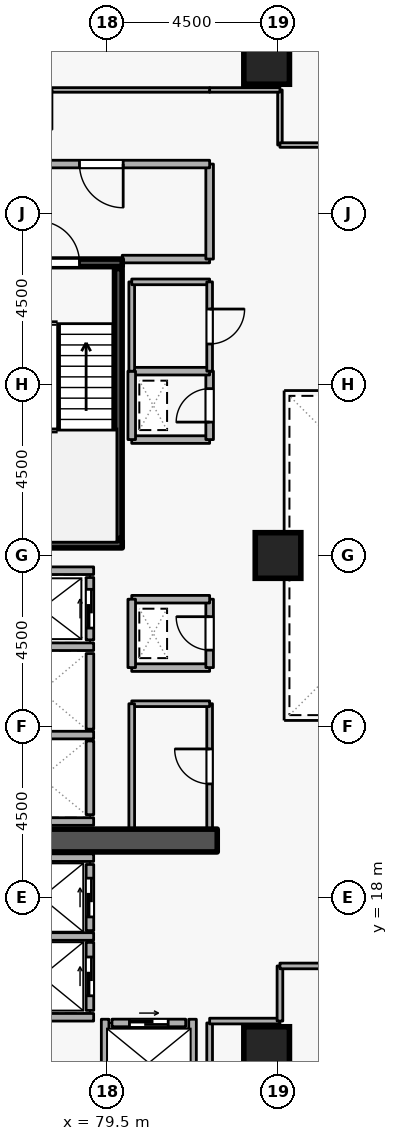
"""IFC4 building model, lengths in metres.
Left out: names, types, materials, properties, quantities, classifications, styles, units other than length and angle.
Written with IfcOpenShell. Run it as: python <this file> out.ifc"""

import sys

from ifc_helpers import new_model, si_unit, direction, frame, frame_2d, origin, origin_2d, place, context, subcontext, project, spatial, rectangle, extrude, element, fill, save


model = new_model("IFC4")
c1 = context("Model", 3, precision=1e-05, world=origin(), true_north=direction((0.0, 1.0)))
c2 = subcontext(c1, "Body", "Model", "MODEL_VIEW")
j1 = project(units=[si_unit("LENGTHUNIT", "METRE"), si_unit("PLANEANGLEUNIT", "RADIAN")], contexts=[c1])
p1 = place(None, origin())
s1 = spatial("IfcSite", under=j1, at=p1, CompositionType="ELEMENT")
p2 = place(p1, origin())
s2 = spatial("IfcBuilding", under=s1, at=p2, CompositionType="ELEMENT")
p3 = place(p2, frame((0.0, 0.0, 101.7)))
s3 = spatial("IfcBuildingStorey", under=s2, at=p3, CompositionType="ELEMENT", Elevation=101.7)
p4 = place(p3, frame((76.7, 19.5, 0.0), z_axis=(0.0, 0.0, 1.0), x_axis=(1.0, 0.0, 0.0)))
e1 = element("IfcWall", 1, at=p4, inside=s3, PredefinedType="SHEAR", context=c2, shape_type="SweptSolid", body=[
    extrude(rectangle(XDim=5.7, YDim=0.6, at=frame_2d((2.85, 0.0))), origin(), (0.0, 0.0, 1.0), 3.6),
])
for number, where, z_axis, x_axis in (
    (2, (83.7, 14.0, 0.0), (0.0, 0.0, 1.0), (1.0, 0.0, 0.0)),
    (3, (83.7, 40.0, 0.0), (0.0, 0.0, 1.0), (1.0, 0.0, 0.0)),
    (4, (84.0, 27.0, 0.0), (0.0, 0.0, 1.0), (1.0, 0.0, 0.0)),
):
    element("IfcColumn", number, at=place(p3, frame(where, z_axis=z_axis, x_axis=x_axis)), inside=s3, PredefinedType="COLUMN", context=c2, shape_type="SweptSolid", body=[
        extrude(rectangle(XDim=1.2, YDim=1.2, at=origin_2d()), origin(), (0.0, 0.0, 1.0), 3.6),
    ])
p5 = place(p3, frame((79.05, 24.78, 0.0), z_axis=(0.0, 0.0, 1.0), x_axis=(0.0, 1.0, 0.0)))
e5 = element("IfcWall", 5, at=p5, inside=s3, PredefinedType="STANDARD", context=c2, shape_type="SweptSolid", body=[
    extrude(rectangle(XDim=1.64, YDim=0.2, at=frame_2d((0.82, 0.0))), origin(), (0.0, 0.0, 1.0), 3.34),
])
p6 = place(p5, frame((0.31, 0.0, 0.0)))
e6 = element("IfcOpeningElement", 6, at=p6, cuts=e5, PredefinedType="OPENING", context=c2, shape_type="SweptSolid", body=[
    extrude(rectangle(XDim=1.02, YDim=2.06, at=frame_2d((0.51, 1.03))), frame((0.0, 0.11, 0.0), z_axis=(0.0, -1.0, 0.0), x_axis=(1.0, 0.0, 0.0)), (0.0, 0.0, 1.0), 0.22),
])
p7 = place(p3, frame((79.05, 22.43, 0.0), z_axis=(0.0, 0.0, 1.0), x_axis=(0.0, 1.0, 0.0)))
e7 = element("IfcWall", 7, at=p7, inside=s3, PredefinedType="STANDARD", context=c2, shape_type="SweptSolid", body=[
    extrude(rectangle(XDim=1.99, YDim=0.2, at=frame_2d((0.995, 0.0))), origin(), (0.0, 0.0, 1.0), 3.34),
])
p8 = place(p3, frame((79.05, 20.18, 0.0), z_axis=(0.0, 0.0, 1.0), x_axis=(0.0, 1.0, 0.0)))
e8 = element("IfcWall", 8, at=p8, inside=s3, PredefinedType="STANDARD", context=c2, shape_type="SweptSolid", body=[
    extrude(rectangle(XDim=1.94, YDim=0.2, at=frame_2d((0.97, 0.0))), origin(), (0.0, 0.0, 1.0), 3.34),
])
p9 = place(p3, frame((79.05, 17.13, 0.0), z_axis=(0.0, 0.0, 1.0), x_axis=(0.0, 1.0, 0.0)))
e9 = element("IfcWall", 9, at=p9, inside=s3, PredefinedType="STANDARD", context=c2, shape_type="SweptSolid", body=[
    extrude(rectangle(XDim=1.74, YDim=0.2, at=frame_2d((0.87, 0.0))), origin(), (0.0, 0.0, 1.0), 3.34),
])
p10 = place(p9, frame((0.36, 0.0, 0.0)))
e10 = element("IfcOpeningElement", 10, at=p10, cuts=e9, PredefinedType="OPENING", context=c2, shape_type="SweptSolid", body=[
    extrude(rectangle(XDim=1.02, YDim=2.06, at=frame_2d((0.51, 1.03))), frame((0.0, 0.11, 0.0), z_axis=(0.0, -1.0, 0.0), x_axis=(1.0, 0.0, 0.0)), (0.0, 0.0, 1.0), 0.22),
])
p11 = place(p3, frame((79.05, 15.03, 0.0), z_axis=(0.0, 0.0, 1.0), x_axis=(0.0, 1.0, 0.0)))
e11 = element("IfcWall", 11, at=p11, inside=s3, PredefinedType="STANDARD", context=c2, shape_type="SweptSolid", body=[
    extrude(rectangle(XDim=1.79, YDim=0.2, at=frame_2d((0.895, 0.0))), origin(), (0.0, 0.0, 1.0), 3.34),
])
p12 = place(p11, frame((0.385, 0.0, 0.0)))
e12 = element("IfcOpeningElement", 12, at=p12, cuts=e11, PredefinedType="OPENING", context=c2, shape_type="SweptSolid", body=[
    extrude(rectangle(XDim=1.02, YDim=2.06, at=frame_2d((0.51, 1.03))), frame((0.0, 0.11, 0.0), z_axis=(0.0, -1.0, 0.0), x_axis=(1.0, 0.0, 0.0)), (0.0, 0.0, 1.0), 0.22),
])
p13 = place(p3, frame((79.63, 14.7, 0.0), z_axis=(0.0, 0.0, 1.0), x_axis=(1.0, 0.0, 0.0)))
e13 = element("IfcWall", 13, at=p13, inside=s3, PredefinedType="STANDARD", context=c2, shape_type="SweptSolid", body=[
    extrude(rectangle(XDim=1.94, YDim=0.2, at=frame_2d((0.97, 0.0))), origin(), (0.0, 0.0, 1.0), 3.34),
])
p14 = place(p13, frame((0.46, 0.0, 0.0)))
e14 = element("IfcOpeningElement", 14, at=p14, cuts=e13, PredefinedType="OPENING", context=c2, shape_type="SweptSolid", body=[
    extrude(rectangle(XDim=1.02, YDim=2.06, at=frame_2d((0.51, 1.03))), frame((0.0, 0.11, 0.0), z_axis=(0.0, -1.0, 0.0), x_axis=(1.0, 0.0, 0.0)), (0.0, 0.0, 1.0), 0.22),
])
for number, where, z_axis, x_axis in (
    (15, (76.712, 26.6, 0.0), (0.0, 0.0, 1.0), (1.0, 0.0, 0.0)),
    (16, (76.712, 24.6, 0.0), (0.0, 0.0, 1.0), (1.0, 0.0, 0.0)),
    (17, (76.712, 22.275, 0.0), (0.0, 0.0, 1.0), (1.0, 0.0, 0.0)),
    (18, (76.712, 20.0, 0.0), (0.0, 0.0, 1.0), (1.0, 0.0, 0.0)),
):
    element("IfcWall", number, at=place(p3, frame(where, z_axis=z_axis, x_axis=x_axis)), inside=s3, PredefinedType="STANDARD", context=c2, shape_type="SweptSolid", body=[
        extrude(rectangle(XDim=2.436, YDim=0.2, at=frame_2d((1.218, 0.0))), origin(), (0.0, 0.0, 1.0), 3.34),
    ])
p15 = place(p3, frame((76.402, 19.05, 0.0), z_axis=(0.0, 0.0, 1.0), x_axis=(1.0, 0.0, 0.0)))
e19 = element("IfcWall", 19, at=p15, inside=s3, PredefinedType="STANDARD", context=c2, shape_type="SweptSolid", body=[
    extrude(rectangle(XDim=2.746, YDim=0.2, at=frame_2d((1.373, 0.0))), origin(), (0.0, 0.0, 1.0), 2.545),
])
p16 = place(p3, frame((76.402, 16.975, 0.0), z_axis=(0.0, 0.0, 1.0), x_axis=(1.0, 0.0, 0.0)))
e20 = element("IfcWall", 20, at=p16, inside=s3, PredefinedType="STANDARD", context=c2, shape_type="SweptSolid", body=[
    extrude(rectangle(XDim=2.746, YDim=0.2, at=frame_2d((1.373, 0.0))), origin(), (0.0, 0.0, 1.0), 3.34),
])
p17 = place(p3, frame((76.512, 14.85, 0.0), z_axis=(0.0, 0.0, 1.0), x_axis=(1.0, 0.0, 0.0)))
e21 = element("IfcWall", 21, at=p17, inside=s3, PredefinedType="STANDARD", context=c2, shape_type="SweptSolid", body=[
    extrude(rectangle(XDim=2.636, YDim=0.2, at=frame_2d((1.318, 0.0))), origin(), (0.0, 0.0, 1.0), 3.34),
])
for number, where, z_axis, x_axis in (
    (22, (81.75, 12.612, 0.0), (0.0, 0.0, 1.0), (0.0, 1.0, 0.0)),
    (23, (79.45, 12.612, 0.0), (0.0, 0.0, 1.0), (0.0, 1.0, 0.0)),
):
    element("IfcWall", number, at=place(p3, frame(where, z_axis=z_axis, x_axis=x_axis)), inside=s3, PredefinedType="STANDARD", context=c2, shape_type="SweptSolid", body=[
        extrude(rectangle(XDim=2.186, YDim=0.2, at=frame_2d((1.093, 0.0))), origin(), (0.0, 0.0, 1.0), 3.34),
    ])
p18 = place(p3, frame((76.55, 34.7, 0.0), z_axis=(0.0, 0.0, 1.0), x_axis=(1.0, 0.0, 0.0)))
e24 = element("IfcWall", 24, at=p18, inside=s3, PredefinedType="SHEAR", context=c2, shape_type="SweptSolid", body=[
    extrude(rectangle(XDim=3.35, YDim=0.2, at=frame_2d((1.675, 0.0))), origin(), (0.0, 0.0, 1.0), 3.6),
])
p19 = place(p18, frame((1.125, 0.0, 0.0)))
e25 = element("IfcOpeningElement", 25, at=p19, cuts=e24, PredefinedType="OPENING", context=c2, shape_type="SweptSolid", body=[
    extrude(rectangle(XDim=1.1, YDim=2.1, at=frame_2d((0.55, 1.05))), frame((0.0, 0.11, 0.0), z_axis=(0.0, -1.0, 0.0), x_axis=(1.0, 0.0, 0.0)), (0.0, 0.0, 1.0), 0.22),
])
p20 = place(p3, frame((79.9, 27.3, 0.0), z_axis=(0.0, 0.0, 1.0), x_axis=(-1.0, 0.0, 0.0)))
e26 = element("IfcWall", 26, at=p20, inside=s3, PredefinedType="SHEAR", context=c2, shape_type="SweptSolid", body=[
    extrude(rectangle(XDim=3.35, YDim=0.2, at=frame_2d((1.675, 0.0))), origin(), (0.0, 0.0, 1.0), 3.6),
])
p21 = place(p3, frame((79.797, 27.45, 0.0), z_axis=(0.0, 0.0, 1.0), x_axis=(0.0, 1.0, 0.0)))
e27 = element("IfcWall", 27, at=p21, inside=s3, PredefinedType="SHEAR", context=c2, shape_type="SweptSolid", body=[
    extrude(rectangle(XDim=7.1, YDim=0.2, at=frame_2d((3.55, 0.0))), origin(), (0.0, 0.0, 1.0), 3.6),
])
p22 = place(p3, frame((79.9, 34.8, 0.0), z_axis=(0.0, 0.0, 1.0), x_axis=(1.0, 0.0, 0.0)))
e28 = element("IfcWall", 28, at=p22, inside=s3, PredefinedType="STANDARD", context=c2, shape_type="SweptSolid", body=[
    extrude(rectangle(XDim=2.3, YDim=0.2, at=frame_2d((1.15, 0.0))), origin(), (0.0, 0.0, 1.0), 2.545),
])
p23 = place(p3, frame((82.2, 34.8, 0.0), z_axis=(0.0, 0.0, 1.0), x_axis=(0.0, 1.0, 0.0)))
e29 = element("IfcWall", 29, at=p23, inside=s3, PredefinedType="STANDARD", context=c2, shape_type="SweptSolid", body=[
    extrude(rectangle(XDim=2.5, YDim=0.2, at=frame_2d((1.25, 0.0))), origin(), (0.0, 0.0, 1.0), 3.34),
])
p24 = place(p3, frame((82.2, 37.3, 0.0), z_axis=(0.0, 0.0, 1.0), x_axis=(-1.0, 0.0, 0.0)))
e30 = element("IfcWall", 30, at=p24, inside=s3, PredefinedType="STANDARD", context=c2, shape_type="SweptSolid", body=[
    extrude(rectangle(XDim=5.7, YDim=0.2, at=frame_2d((2.85, 0.0))), origin(), (0.0, 0.0, 1.0), 3.34),
])
p25 = place(p24, frame((2.275, 0.0, 0.0)))
e31 = element("IfcOpeningElement", 31, at=p25, cuts=e30, PredefinedType="OPENING", context=c2, shape_type="SweptSolid", body=[
    extrude(rectangle(XDim=1.15, YDim=2.1, at=frame_2d((0.575, 1.05))), frame((0.0, 0.11, 0.0), z_axis=(0.0, -1.0, 0.0), x_axis=(1.0, 0.0, 0.0)), (0.0, 0.0, 1.0), 0.22),
])
p26 = place(p3, frame((80.15, 24.05, 0.0), z_axis=(0.0, 0.0, 1.0), x_axis=(1.0, 0.0, 0.0)))
e32 = element("IfcWall", 32, at=p26, inside=s3, PredefinedType="STANDARD", context=c2, shape_type="SweptSolid", body=[
    extrude(rectangle(XDim=2.05, YDim=0.2, at=frame_2d((1.025, 0.0))), origin(), (0.0, 0.0, 1.0), 3.34),
])
p27 = place(p3, frame((82.2, 24.05, 0.0), z_axis=(0.0, 0.0, 1.0), x_axis=(0.0, 1.0, 0.0)))
e33 = element("IfcWall", 33, at=p27, inside=s3, PredefinedType="STANDARD", context=c2, shape_type="SweptSolid", body=[
    extrude(rectangle(XDim=1.8, YDim=0.2, at=frame_2d((0.9, 0.0))), origin(), (0.0, 0.0, 1.0), 3.34),
])
p28 = place(p27, frame((0.46, 0.0, 0.0)))
e34 = element("IfcOpeningElement", 34, at=p28, cuts=e33, PredefinedType="OPENING", context=c2, shape_type="SweptSolid", body=[
    extrude(rectangle(XDim=0.88, YDim=2.04, at=frame_2d((0.44, 1.02))), frame((0.0, 0.11, 0.0), z_axis=(0.0, -1.0, 0.0), x_axis=(1.0, 0.0, 0.0)), (0.0, 0.0, 1.0), 0.22),
])
p29 = place(p3, frame((82.2, 25.85, 0.0), z_axis=(0.0, 0.0, 1.0), x_axis=(-1.0, 0.0, 0.0)))
e35 = element("IfcWall", 35, at=p29, inside=s3, PredefinedType="STANDARD", context=c2, shape_type="SweptSolid", body=[
    extrude(rectangle(XDim=2.05, YDim=0.2, at=frame_2d((1.025, 0.0))), origin(), (0.0, 0.0, 1.0), 3.34),
])
p30 = place(p3, frame((80.15, 25.85, 0.0), z_axis=(0.0, 0.0, 1.0), x_axis=(0.0, -1.0, 0.0)))
e36 = element("IfcWall", 36, at=p30, inside=s3, PredefinedType="STANDARD", context=c2, shape_type="SweptSolid", body=[
    extrude(rectangle(XDim=1.8, YDim=0.2, at=frame_2d((0.9, 0.0))), origin(), (0.0, 0.0, 1.0), 3.34),
])
p31 = place(p3, frame((80.15, 30.05, 0.0), z_axis=(0.0, 0.0, 1.0), x_axis=(1.0, 0.0, 0.0)))
e37 = element("IfcWall", 37, at=p31, inside=s3, PredefinedType="STANDARD", context=c2, shape_type="SweptSolid", body=[
    extrude(rectangle(XDim=2.05, YDim=0.2, at=frame_2d((1.025, 0.0))), origin(), (0.0, 0.0, 1.0), 3.34),
])
p32 = place(p3, frame((82.2, 30.05, 0.0), z_axis=(0.0, 0.0, 1.0), x_axis=(0.0, 1.0, 0.0)))
e38 = element("IfcWall", 38, at=p32, inside=s3, PredefinedType="STANDARD", context=c2, shape_type="SweptSolid", body=[
    extrude(rectangle(XDim=1.8, YDim=0.2, at=frame_2d((0.9, 0.0))), origin(), (0.0, 0.0, 1.0), 3.34),
])
p33 = place(p32, frame((0.46, 0.0, 0.0)))
e39 = element("IfcOpeningElement", 39, at=p33, cuts=e38, PredefinedType="OPENING", context=c2, shape_type="SweptSolid", body=[
    extrude(rectangle(XDim=0.88, YDim=2.04, at=frame_2d((0.44, 1.02))), frame((0.0, 0.11, 0.0), z_axis=(0.0, -1.0, 0.0), x_axis=(1.0, 0.0, 0.0)), (0.0, 0.0, 1.0), 0.22),
])
p34 = place(p3, frame((82.2, 31.85, 0.0), z_axis=(0.0, 0.0, 1.0), x_axis=(-1.0, 0.0, 0.0)))
e40 = element("IfcWall", 40, at=p34, inside=s3, PredefinedType="STANDARD", context=c2, shape_type="SweptSolid", body=[
    extrude(rectangle(XDim=2.05, YDim=0.2, at=frame_2d((1.025, 0.0))), origin(), (0.0, 0.0, 1.0), 3.34),
])
p35 = place(p3, frame((80.15, 31.85, 0.0), z_axis=(0.0, 0.0, 1.0), x_axis=(0.0, -1.0, 0.0)))
e41 = element("IfcWall", 41, at=p35, inside=s3, PredefinedType="STANDARD", context=c2, shape_type="SweptSolid", body=[
    extrude(rectangle(XDim=1.8, YDim=0.2, at=frame_2d((0.9, 0.0))), origin(), (0.0, 0.0, 1.0), 3.34),
])
p36 = place(p3, frame((82.2, 19.8, 0.0), z_axis=(0.0, 0.0, 1.0), x_axis=(0.0, 1.0, 0.0)))
e42 = element("IfcWall", 42, at=p36, inside=s3, PredefinedType="PARTITIONING", context=c2, shape_type="SweptSolid", body=[
    extrude(rectangle(XDim=3.3, YDim=0.15, at=frame_2d((1.65, 0.0))), origin(), (0.0, 0.0, 1.0), 3.34),
])
p37 = place(p36, frame((1.19, 0.0, 0.0)))
e43 = element("IfcOpeningElement", 43, at=p37, cuts=e42, PredefinedType="OPENING", context=c2, shape_type="SweptSolid", body=[
    extrude(rectangle(XDim=0.92, YDim=2.08, at=frame_2d((0.46, 1.04))), frame((0.0, 0.085, 0.0), z_axis=(0.0, -1.0, 0.0), x_axis=(1.0, 0.0, 0.0)), (0.0, 0.0, 1.0), 0.17),
])
p38 = place(p3, frame((82.2, 23.1, 0.0), z_axis=(0.0, 0.0, 1.0), x_axis=(-1.0, 0.0, 0.0)))
e44 = element("IfcWall", 44, at=p38, inside=s3, PredefinedType="PARTITIONING", context=c2, shape_type="SweptSolid", body=[
    extrude(rectangle(XDim=2.05, YDim=0.15, at=frame_2d((1.025, 0.0))), origin(), (0.0, 0.0, 1.0), 3.34),
])
p39 = place(p3, frame((80.15, 23.1, 0.0), z_axis=(0.0, 0.0, 1.0), x_axis=(0.0, -1.0, 0.0)))
e45 = element("IfcWall", 45, at=p39, inside=s3, PredefinedType="PARTITIONING", context=c2, shape_type="SweptSolid", body=[
    extrude(rectangle(XDim=3.3, YDim=0.15, at=frame_2d((1.65, 0.0))), origin(), (0.0, 0.0, 1.0), 3.34),
])
p40 = place(p3, frame((80.15, 31.85, 0.0), z_axis=(0.0, 0.0, 1.0), x_axis=(0.0, 1.0, 0.0)))
e46 = element("IfcWall", 46, at=p40, inside=s3, PredefinedType="PARTITIONING", context=c2, shape_type="SweptSolid", body=[
    extrude(rectangle(XDim=2.35, YDim=0.15, at=frame_2d((1.175, 0.0))), origin(), (0.0, 0.0, 1.0), 3.34),
])
p41 = place(p3, frame((80.15, 34.2, 0.0), z_axis=(0.0, 0.0, 1.0), x_axis=(1.0, 0.0, 0.0)))
e47 = element("IfcWall", 47, at=p41, inside=s3, PredefinedType="PARTITIONING", context=c2, shape_type="SweptSolid", body=[
    extrude(rectangle(XDim=2.05, YDim=0.15, at=frame_2d((1.025, 0.0))), origin(), (0.0, 0.0, 1.0), 2.545),
])
p42 = place(p3, frame((82.2, 34.2, 0.0), z_axis=(0.0, 0.0, 1.0), x_axis=(0.0, -1.0, 0.0)))
e48 = element("IfcWall", 48, at=p42, inside=s3, PredefinedType="PARTITIONING", context=c2, shape_type="SweptSolid", body=[
    extrude(rectangle(XDim=2.35, YDim=0.15, at=frame_2d((1.175, 0.0))), origin(), (0.0, 0.0, 1.0), 3.34),
])
p43 = place(p42, frame((0.715, 0.0, 0.0)))
e49 = element("IfcOpeningElement", 49, at=p43, cuts=e48, PredefinedType="OPENING", context=c2, shape_type="SweptSolid", body=[
    extrude(rectangle(XDim=0.92, YDim=2.08, at=frame_2d((0.46, 1.04))), frame((0.0, 0.085, 0.0), z_axis=(0.0, -1.0, 0.0), x_axis=(1.0, 0.0, 0.0)), (0.0, 0.0, 1.0), 0.17),
])
p44 = place(p3, frame((82.2, 12.4, 0.0), z_axis=(0.0, 0.0, 1.0), x_axis=(0.0, 1.0, 0.0)))
e50 = element("IfcWall", 50, at=p44, inside=s3, PredefinedType="PARTITIONING", context=c2, shape_type="SweptSolid", body=[
    extrude(rectangle(XDim=2.3, YDim=0.15, at=frame_2d((1.15, 0.0))), origin(), (0.0, 0.0, 1.0), 3.34),
])
p45 = place(p3, frame((82.2, 14.75, 0.0), z_axis=(0.0, 0.0, 1.0), x_axis=(1.0, 0.0, 0.0)))
e51 = element("IfcWall", 51, at=p45, inside=s3, PredefinedType="PARTITIONING", context=c2, shape_type="SweptSolid", body=[
    extrude(rectangle(XDim=1.85, YDim=0.15, at=frame_2d((0.925, 0.0))), origin(), (0.0, 0.0, 1.0), 3.34),
])
p46 = place(p3, frame((84.05, 14.75, 0.0), z_axis=(0.0, 0.0, 1.0), x_axis=(0.0, 1.0, 0.0)))
e52 = element("IfcWall", 52, at=p46, inside=s3, PredefinedType="PARTITIONING", context=c2, shape_type="SweptSolid", body=[
    extrude(rectangle(XDim=1.45, YDim=0.15, at=frame_2d((0.725, 0.0))), origin(), (0.0, 0.0, 1.0), 3.34),
])
p47 = place(p3, frame((84.05, 16.2, 0.0), z_axis=(0.0, 0.0, 1.0), x_axis=(1.0, 0.0, 0.0)))
e53 = element("IfcWall", 53, at=p47, inside=s3, PredefinedType="PARTITIONING", context=c2, shape_type="SweptSolid", body=[
    extrude(rectangle(XDim=4.45, YDim=0.15, at=frame_2d((2.225, 0.0))), origin(), (0.0, 0.0, 1.0), 3.34),
])
p48 = place(p47, frame((1.575, 0.0, 0.0)))
e54 = element("IfcOpeningElement", 54, at=p48, cuts=e53, PredefinedType="OPENING", context=c2, shape_type="SweptSolid", body=[
    extrude(rectangle(XDim=1.3, YDim=2.12, at=frame_2d((0.65, 1.06))), frame((0.0, 0.085, 0.0), z_axis=(0.0, -1.0, 0.0), x_axis=(1.0, 0.0, 0.0)), (0.0, 0.0, 1.0), 0.17),
])
p49 = place(p3, frame((84.05, 37.8, 0.0), z_axis=(0.0, 0.0, 1.0), x_axis=(0.0, 1.0, 0.0)))
e55 = element("IfcWall", 55, at=p49, inside=s3, PredefinedType="PARTITIONING", context=c2, shape_type="SweptSolid", body=[
    extrude(rectangle(XDim=1.45, YDim=0.12, at=frame_2d((0.725, 0.0))), origin(), (0.0, 0.0, 1.0), 3.34),
])
p50 = place(p3, frame((84.05, 39.25, 0.0), z_axis=(0.0, 0.0, 1.0), x_axis=(-1.0, 0.0, 0.0)))
e56 = element("IfcWall", 56, at=p50, inside=s3, PredefinedType="PARTITIONING", context=c2, shape_type="SweptSolid", body=[
    extrude(rectangle(XDim=1.85, YDim=0.12, at=frame_2d((0.925, 0.0))), origin(), (0.0, 0.0, 1.0), 3.34),
])
p51 = place(p3, frame((82.2, 39.25, 0.0), z_axis=(0.0, 0.0, 1.0), x_axis=(-1.0, 0.0, 0.0)))
e57 = element("IfcWall", 57, at=p51, inside=s3, PredefinedType="PARTITIONING", context=c2, shape_type="SweptSolid", body=[
    extrude(rectangle(XDim=9.35, YDim=0.12, at=frame_2d((4.675, 0.0))), origin(), (0.0, 0.0, 1.0), 3.34),
])
p52 = place(p51, frame((4.15, 0.0, 0.0)))
e58 = element("IfcOpeningElement", 58, at=p52, cuts=e57, PredefinedType="OPENING", context=c2, shape_type="SweptSolid", body=[
    extrude(rectangle(XDim=1.05, YDim=2.1, at=frame_2d((0.525, 1.05))), frame((0.0, 0.07, 0.0), z_axis=(0.0, -1.0, 0.0), x_axis=(1.0, 0.0, 0.0)), (0.0, 0.0, 1.0), 0.14),
])
p53 = place(p3, frame((88.5, 37.8, 0.0), z_axis=(0.0, 0.0, 1.0), x_axis=(-1.0, 0.0, 0.0)))
e59 = element("IfcWall", 59, at=p53, inside=s3, PredefinedType="PARTITIONING", context=c2, shape_type="SweptSolid", body=[
    extrude(rectangle(XDim=4.45, YDim=0.12, at=frame_2d((2.225, 0.0))), origin(), (0.0, 0.0, 1.0), 3.34),
])
p54 = place(p6, origin())
e60 = element("IfcDoor", 60, at=p54, inside=s3, OperationType="SLIDING_TO_LEFT", PredefinedType="DOOR", context=c2, shape_type="SweptSolid", body=[
    extrude(rectangle(XDim=1.02, YDim=2.06, at=frame_2d((0.51, 1.03))), frame((0.0, 0.025, 0.0), z_axis=(0.0, -1.0, 0.0), x_axis=(1.0, 0.0, 0.0)), (0.0, 0.0, 1.0), 0.05),
])
fill(e6, e60)
p55 = place(p10, origin())
e61 = element("IfcDoor", 61, at=p55, inside=s3, OperationType="SLIDING_TO_LEFT", PredefinedType="DOOR", context=c2, shape_type="SweptSolid", body=[
    extrude(rectangle(XDim=1.02, YDim=2.06, at=frame_2d((0.51, 1.03))), frame((0.0, 0.025, 0.0), z_axis=(0.0, -1.0, 0.0), x_axis=(1.0, 0.0, 0.0)), (0.0, 0.0, 1.0), 0.05),
])
fill(e10, e61)
p56 = place(p12, origin())
e62 = element("IfcDoor", 62, at=p56, inside=s3, OperationType="SLIDING_TO_LEFT", PredefinedType="DOOR", context=c2, shape_type="SweptSolid", body=[
    extrude(rectangle(XDim=1.02, YDim=2.06, at=frame_2d((0.51, 1.03))), frame((0.0, 0.025, 0.0), z_axis=(0.0, -1.0, 0.0), x_axis=(1.0, 0.0, 0.0)), (0.0, 0.0, 1.0), 0.05),
])
fill(e12, e62)
p57 = place(p14, origin())
e63 = element("IfcDoor", 63, at=p57, inside=s3, OperationType="SLIDING_TO_LEFT", PredefinedType="DOOR", context=c2, shape_type="SweptSolid", body=[
    extrude(rectangle(XDim=1.02, YDim=2.06, at=frame_2d((0.51, 1.03))), frame((0.0, 0.025, 0.0), z_axis=(0.0, -1.0, 0.0), x_axis=(1.0, 0.0, 0.0)), (0.0, 0.0, 1.0), 0.05),
])
fill(e14, e63)
p58 = place(p19, origin())
e64 = element("IfcDoor", 64, at=p58, inside=s3, OperationType="SINGLE_SWING_LEFT", PredefinedType="DOOR", context=c2, shape_type="SweptSolid", body=[
    extrude(rectangle(XDim=1.1, YDim=2.1, at=frame_2d((0.55, 1.05))), frame((0.0, 0.025, 0.0), z_axis=(0.0, -1.0, 0.0), x_axis=(1.0, 0.0, 0.0)), (0.0, 0.0, 1.0), 0.05),
])
fill(e25, e64)
p59 = place(p25, origin())
e65 = element("IfcDoor", 65, at=p59, inside=s3, OperationType="SINGLE_SWING_LEFT", PredefinedType="DOOR", context=c2, shape_type="SweptSolid", body=[
    extrude(rectangle(XDim=1.15, YDim=2.1, at=frame_2d((0.575, 1.05))), frame((0.0, 0.025, 0.0), z_axis=(0.0, -1.0, 0.0), x_axis=(1.0, 0.0, 0.0)), (0.0, 0.0, 1.0), 0.05),
])
fill(e31, e65)
p60 = place(p28, origin())
e66 = element("IfcDoor", 66, at=p60, inside=s3, OperationType="SINGLE_SWING_RIGHT", PredefinedType="DOOR", context=c2, shape_type="SweptSolid", body=[
    extrude(rectangle(XDim=0.88, YDim=2.04, at=frame_2d((0.44, 1.02))), frame((0.0, 0.025, 0.0), z_axis=(0.0, -1.0, 0.0), x_axis=(1.0, 0.0, 0.0)), (0.0, 0.0, 1.0), 0.05),
])
fill(e34, e66)
p61 = place(p33, origin())
e67 = element("IfcDoor", 67, at=p61, inside=s3, OperationType="SINGLE_SWING_LEFT", PredefinedType="DOOR", context=c2, shape_type="SweptSolid", body=[
    extrude(rectangle(XDim=0.88, YDim=2.04, at=frame_2d((0.44, 1.02))), frame((0.0, 0.025, 0.0), z_axis=(0.0, -1.0, 0.0), x_axis=(1.0, 0.0, 0.0)), (0.0, 0.0, 1.0), 0.05),
])
fill(e39, e67)
p62 = place(p37, origin())
e68 = element("IfcDoor", 68, at=p62, inside=s3, OperationType="SINGLE_SWING_RIGHT", PredefinedType="DOOR", context=c2, shape_type="SweptSolid", body=[
    extrude(rectangle(XDim=0.92, YDim=2.08, at=frame_2d((0.46, 1.04))), frame((0.0, 0.025, 0.0), z_axis=(0.0, -1.0, 0.0), x_axis=(1.0, 0.0, 0.0)), (0.0, 0.0, 1.0), 0.05),
])
fill(e43, e68)
p63 = place(p43, origin())
e69 = element("IfcDoor", 69, at=p63, inside=s3, OperationType="SINGLE_SWING_LEFT", PredefinedType="DOOR", context=c2, shape_type="SweptSolid", body=[
    extrude(rectangle(XDim=0.92, YDim=2.08, at=frame_2d((0.46, 1.04))), frame((0.0, 0.025, 0.0), z_axis=(0.0, -1.0, 0.0), x_axis=(1.0, 0.0, 0.0)), (0.0, 0.0, 1.0), 0.05),
])
fill(e49, e69)
p64 = place(p52, origin())
e70 = element("IfcDoor", 70, at=p64, inside=s3, OperationType="SINGLE_SWING_LEFT", PredefinedType="DOOR", context=c2, shape_type="SweptSolid", body=[
    extrude(rectangle(XDim=1.05, YDim=2.1, at=frame_2d((0.525, 1.05))), frame((0.0, 0.025, 0.0), z_axis=(0.0, -1.0, 0.0), x_axis=(1.0, 0.0, 0.0)), (0.0, 0.0, 1.0), 0.05),
])
fill(e58, e70)
save(model, sys.argv[1])
